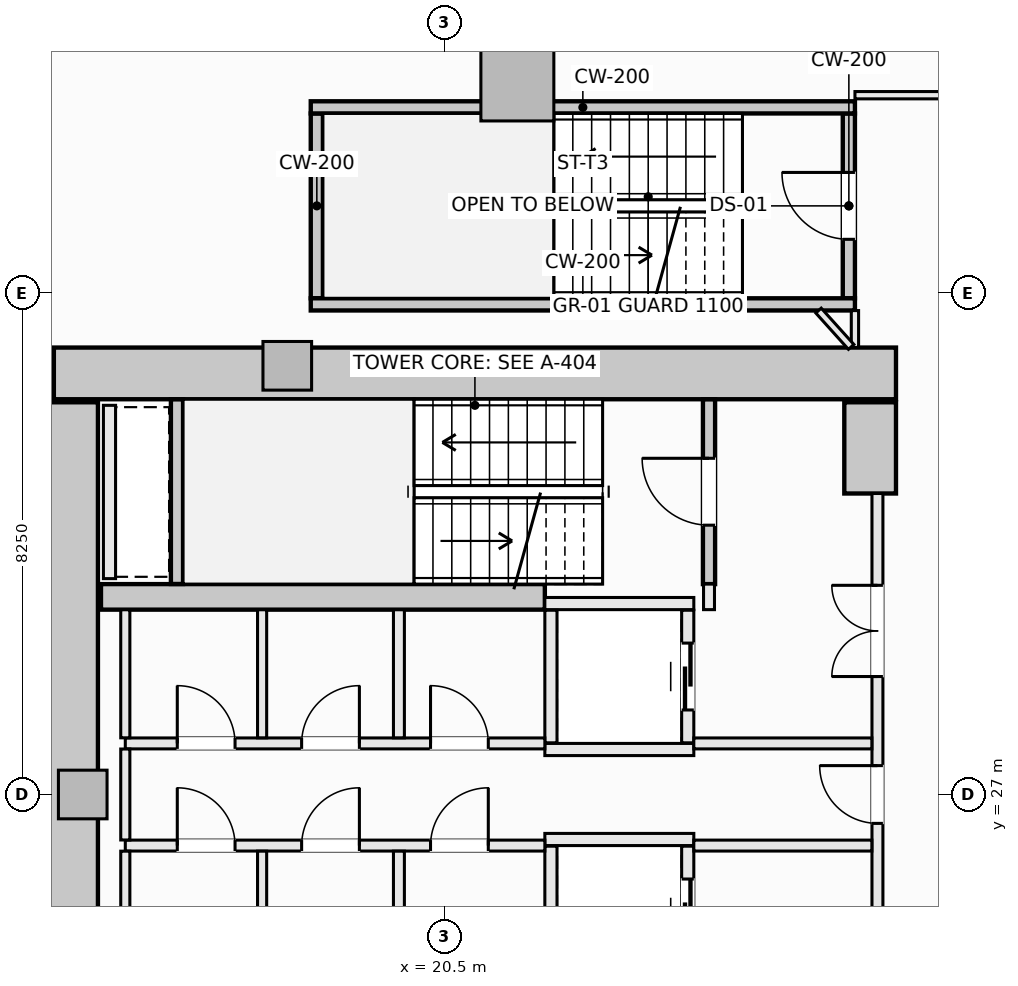
"""IFC4 building model, lengths in metres.
Left out: names, types, materials, properties, quantities, classifications, styles, units other than length and angle.
Written with IfcOpenShell. Run it as: python <this file> out.ifc"""

import sys

from ifc_helpers import new_model, si_unit, direction, frame, frame_2d, origin, origin_2d, place, context, subcontext, project, spatial, rectangle, extrude, element, fill, save


model = new_model("IFC4")
c1 = context("Model", 3, precision=1e-05, world=origin(), true_north=direction((0.0, 1.0)))
c2 = subcontext(c1, "Body", "Model", "MODEL_VIEW")
j1 = project(units=[si_unit("LENGTHUNIT", "METRE"), si_unit("PLANEANGLEUNIT", "RADIAN")], contexts=[c1])
p1 = place(None, origin())
s1 = spatial("IfcSite", under=j1, at=p1, CompositionType="ELEMENT")
p2 = place(p1, origin())
s2 = spatial("IfcBuilding", under=s1, at=p2, CompositionType="ELEMENT")
p3 = place(p2, frame((0.0, 0.0, 91.95)))
s3 = spatial("IfcBuildingStorey", under=s2, at=p3, CompositionType="ELEMENT", Elevation=91.95)
p4 = place(p3, frame((14.075, 33.925, -0.28), z_axis=(0.0, 0.0, 1.0), x_axis=(1.0, 0.0, 0.0)))
e1 = element("IfcWall", 1, at=p4, inside=s3, PredefinedType="SHEAR", context=c2, shape_type="SweptSolid", body=[
    extrude(rectangle(XDim=13.85, YDim=0.85, at=frame_2d((6.925, 0.0))), origin(), (0.0, 0.0, 1.0), 3.81),
])
p5 = place(p3, frame((14.375, 20.55, -0.28), z_axis=(0.0, 0.0, 1.0), x_axis=(0.0, 1.0, 0.0)))
e2 = element("IfcWall", 2, at=p5, inside=s3, PredefinedType="SHEAR", context=c2, shape_type="SweptSolid", body=[
    extrude(rectangle(XDim=12.9, YDim=0.85, at=frame_2d((6.45, 0.0))), origin(), (0.0, 0.0, 1.0), 3.81),
])
p6 = place(p3, frame((27.5, 31.95, -0.28), z_axis=(0.0, 0.0, 1.0), x_axis=(0.0, 1.0, 0.0)))
e3 = element("IfcWall", 3, at=p6, inside=s3, PredefinedType="SHEAR", context=c2, shape_type="SweptSolid", body=[
    extrude(rectangle(XDim=1.5, YDim=0.85, at=frame_2d((0.75, 0.0))), origin(), (0.0, 0.0, 1.0), 3.81),
])
p7 = place(p3, frame((14.85, 30.25, -0.28), z_axis=(0.0, 0.0, 1.0), x_axis=(1.0, 0.0, 0.0)))
e4 = element("IfcWall", 4, at=p7, inside=s3, PredefinedType="SHEAR", context=c2, shape_type="SweptSolid", body=[
    extrude(rectangle(XDim=7.3, YDim=0.42, at=frame_2d((3.65, 0.0))), origin(), (0.0, 0.0, 1.0), 3.81),
])
p8 = place(p3, frame((21.698, 38.677, -0.28), z_axis=(0.0, 0.0, 1.0), x_axis=(1.0, 0.0, 0.0)))
e5 = element("IfcColumn", 5, at=p8, inside=s3, PredefinedType="COLUMN", context=c2, shape_type="SweptSolid", body=[
    extrude(rectangle(XDim=1.2, YDim=1.2, at=origin_2d()), origin(), (0.0, 0.0, 1.0), 3.81),
])
for number, where, z_axis, x_axis in (
    (6, (17.914, 34.05, -0.28), (0.0, 0.0, 1.0), (1.0, 0.0, 0.0)),
    (7, (14.55, 27.0, -0.28), (0.0, 0.0, 1.0), (1.0, 0.0, 0.0)),
):
    element("IfcColumn", number, at=place(p3, frame(where, z_axis=z_axis, x_axis=x_axis)), inside=s3, PredefinedType="PILASTER", context=c2, shape_type="SweptSolid", body=[
        extrude(rectangle(XDim=0.8, YDim=0.8, at=origin_2d()), origin(), (0.0, 0.0, 1.0), 3.81),
    ])
p9 = place(p3, frame((24.85, 30.46, -0.28), z_axis=(0.0, 0.0, 1.0), x_axis=(0.0, 1.0, 0.0)))
e8 = element("IfcWall", 8, at=p9, inside=s3, PredefinedType="SHEAR", context=c2, shape_type="SweptSolid", body=[
    extrude(rectangle(XDim=3.038, YDim=0.2, at=frame_2d((1.519, 0.0))), origin(), (0.0, 0.0, 1.0), 3.81),
])
p10 = place(p9, frame((0.969, 0.0, 0.28)))
e9 = element("IfcOpeningElement", 9, at=p10, cuts=e8, PredefinedType="OPENING", context=c2, shape_type="SweptSolid", body=[
    extrude(rectangle(XDim=1.1, YDim=2.15, at=frame_2d((0.55, 1.075))), frame((0.0, 0.11, 0.0), z_axis=(0.0, -1.0, 0.0), x_axis=(1.0, 0.0, 0.0)), (0.0, 0.0, 1.0), 0.22),
])
p11 = place(p3, frame((16.1, 30.462, -0.28), z_axis=(0.0, 0.0, 1.0), x_axis=(0.0, 1.0, 0.0)))
e10 = element("IfcWall", 10, at=p11, inside=s3, PredefinedType="SHEAR", context=c2, shape_type="SweptSolid", body=[
    extrude(rectangle(XDim=3.036, YDim=0.2, at=frame_2d((1.518, 0.0))), origin(), (0.0, 0.0, 1.0), 3.81),
])
p12 = place(p3, frame((27.15, 35.16, -0.28), z_axis=(0.0, 0.0, 1.0), x_axis=(0.0, 1.0, 0.0)))
e11 = element("IfcWall", 11, at=p12, inside=s3, PredefinedType="SHEAR", context=c2, shape_type="SweptSolid", body=[
    extrude(rectangle(XDim=3.04, YDim=0.2, at=frame_2d((1.52, 0.0))), origin(), (0.0, 0.0, 1.0), 3.81),
])
p13 = place(p12, frame((0.97, 0.0, 0.28)))
e12 = element("IfcOpeningElement", 12, at=p13, cuts=e11, PredefinedType="OPENING", context=c2, shape_type="SweptSolid", body=[
    extrude(rectangle(XDim=1.1, YDim=2.15, at=frame_2d((0.55, 1.075))), frame((0.0, 0.11, 0.0), z_axis=(0.0, -1.0, 0.0), x_axis=(1.0, 0.0, 0.0)), (0.0, 0.0, 1.0), 0.22),
])
p14 = place(p3, frame((18.4, 35.16, -0.28), z_axis=(0.0, 0.0, 1.0), x_axis=(0.0, 1.0, 0.0)))
e13 = element("IfcWall", 13, at=p14, inside=s3, PredefinedType="SHEAR", context=c2, shape_type="SweptSolid", body=[
    extrude(rectangle(XDim=3.04, YDim=0.2, at=frame_2d((1.52, 0.0))), origin(), (0.0, 0.0, 1.0), 3.81),
])
for number, where, z_axis, x_axis in (
    (14, (18.3, 38.3, -0.28), (0.0, 0.0, 1.0), (1.0, 0.0, 0.0)),
    (15, (18.3, 35.06, -0.28), (0.0, 0.0, 1.0), (1.0, 0.0, 0.0)),
):
    element("IfcWall", number, at=place(p3, frame(where, z_axis=z_axis, x_axis=x_axis)), inside=s3, PredefinedType="SHEAR", context=c2, shape_type="SweptSolid", body=[
        extrude(rectangle(XDim=8.95, YDim=0.2, at=frame_2d((4.475, 0.0))), origin(), (0.0, 0.0, 1.0), 3.81),
    ])
for number, where, z_axis, x_axis in (
    (16, (22.15, 30.14, 0.0), (0.0, 0.0, 1.0), (1.0, 0.0, 0.0)),
    (17, (22.15, 27.74, 0.0), (0.0, 0.0, 1.0), (1.0, 0.0, 0.0)),
):
    element("IfcWall", number, at=place(p3, frame(where, z_axis=z_axis, x_axis=x_axis)), inside=s3, PredefinedType="SOLIDWALL", context=c2, shape_type="SweptSolid", body=[
        extrude(rectangle(XDim=2.45, YDim=0.2, at=frame_2d((1.225, 0.0))), origin(), (0.0, 0.0, 1.0), 3.53),
    ])
p15 = place(p3, frame((22.25, 27.85, 0.0), z_axis=(0.0, 0.0, 1.0), x_axis=(0.0, 1.0, 0.0)))
e18 = element("IfcWall", 18, at=p15, inside=s3, PredefinedType="SOLIDWALL", context=c2, shape_type="SweptSolid", body=[
    extrude(rectangle(XDim=2.18, YDim=0.2, at=frame_2d((1.09, 0.0))), origin(), (0.0, 0.0, 1.0), 3.53),
])
p16 = place(p3, frame((24.5, 27.85, 0.0), z_axis=(0.0, 0.0, 1.0), x_axis=(0.0, 1.0, 0.0)))
e19 = element("IfcWall", 19, at=p16, inside=s3, PredefinedType="SOLIDWALL", context=c2, shape_type="SweptSolid", body=[
    extrude(rectangle(XDim=2.18, YDim=0.2, at=frame_2d((1.09, 0.0))), origin(), (0.0, 0.0, 1.0), 3.53),
])
p17 = place(p16, frame((0.54, 0.0, 0.0)))
e20 = element("IfcOpeningElement", 20, at=p17, cuts=e19, PredefinedType="OPENING", context=c2, shape_type="SweptSolid", body=[
    extrude(rectangle(XDim=1.1, YDim=2.2, at=frame_2d((0.55, 1.1))), frame((0.0, 0.11, 0.0), z_axis=(0.0, -1.0, 0.0), x_axis=(1.0, 0.0, 0.0)), (0.0, 0.0, 1.0), 0.22),
])
p18 = place(p3, frame((22.15, 26.26, 0.0), z_axis=(0.0, 0.0, 1.0), x_axis=(1.0, 0.0, 0.0)))
e21 = element("IfcWall", 21, at=p18, inside=s3, PredefinedType="SOLIDWALL", context=c2, shape_type="SweptSolid", body=[
    extrude(rectangle(XDim=2.45, YDim=0.2, at=frame_2d((1.225, 0.0))), origin(), (0.0, 0.0, 1.0), 3.53),
])
p19 = place(p3, frame((22.25, 23.97, 0.0), z_axis=(0.0, 0.0, 1.0), x_axis=(0.0, 1.0, 0.0)))
e22 = element("IfcWall", 22, at=p19, inside=s3, PredefinedType="SOLIDWALL", context=c2, shape_type="SweptSolid", body=[
    extrude(rectangle(XDim=2.18, YDim=0.2, at=frame_2d((1.09, 0.0))), origin(), (0.0, 0.0, 1.0), 3.53),
])
p20 = place(p3, frame((24.5, 23.97, 0.0), z_axis=(0.0, 0.0, 1.0), x_axis=(0.0, 1.0, 0.0)))
e23 = element("IfcWall", 23, at=p20, inside=s3, PredefinedType="SOLIDWALL", context=c2, shape_type="SweptSolid", body=[
    extrude(rectangle(XDim=2.18, YDim=0.2, at=frame_2d((1.09, 0.0))), origin(), (0.0, 0.0, 1.0), 3.53),
])
p21 = place(p20, frame((0.54, 0.0, 0.0)))
e24 = element("IfcOpeningElement", 24, at=p21, cuts=e23, PredefinedType="OPENING", context=c2, shape_type="SweptSolid", body=[
    extrude(rectangle(XDim=1.1, YDim=2.2, at=frame_2d((0.55, 1.1))), frame((0.0, 0.11, 0.0), z_axis=(0.0, -1.0, 0.0), x_axis=(1.0, 0.0, 0.0)), (0.0, 0.0, 1.0), 0.22),
])
p22 = place(p3, frame((14.99, 30.55, 0.0), z_axis=(0.0, 0.0, 1.0), x_axis=(0.0, 1.0, 0.0)))
e25 = element("IfcWall", 25, at=p22, inside=s3, PredefinedType="SOLIDWALL", context=c2, shape_type="SweptSolid", body=[
    extrude(rectangle(XDim=2.85, YDim=0.2, at=frame_2d((1.425, 0.0))), origin(), (0.0, 0.0, 1.0), 3.53),
])
p23 = place(p3, frame((24.85, 30.04, 0.0), z_axis=(0.0, 0.0, 1.0), x_axis=(0.0, 1.0, 0.0)))
e26 = element("IfcWall", 26, at=p23, inside=s3, PredefinedType="SOLIDWALL", context=c2, shape_type="SweptSolid", body=[
    extrude(rectangle(XDim=0.42, YDim=0.18, at=frame_2d((0.21, 0.0))), origin(), (0.0, 0.0, 1.0), 3.53),
])
p24 = place(p3, frame((27.62, 22.05, 0.0), z_axis=(0.0, 0.0, 1.0), x_axis=(0.0, 1.0, 0.0)))
e27 = element("IfcWall", 27, at=p24, inside=s3, PredefinedType="SOLIDWALL", context=c2, shape_type="SweptSolid", body=[
    extrude(rectangle(XDim=9.9, YDim=0.18, at=frame_2d((4.95, 0.0))), origin(), (0.0, 0.0, 1.0), 2.622),
])
p25 = place(p24, frame((4.475, 0.0, 0.0)))
e28 = element("IfcOpeningElement", 28, at=p25, cuts=e27, PredefinedType="OPENING", context=c2, shape_type="SweptSolid", body=[
    extrude(rectangle(XDim=0.95, YDim=2.1, at=frame_2d((0.475, 1.05))), frame((0.0, 0.1, 0.0), z_axis=(0.0, -1.0, 0.0), x_axis=(1.0, 0.0, 0.0)), (0.0, 0.0, 1.0), 0.2),
])
p26 = place(p24, frame((6.89, 0.0, 0.0)))
e29 = element("IfcOpeningElement", 29, at=p26, cuts=e27, PredefinedType="OPENING", context=c2, shape_type="SweptSolid", body=[
    extrude(rectangle(XDim=1.5, YDim=2.2, at=frame_2d((0.75, 1.1))), frame((0.0, 0.1, 0.0), z_axis=(0.0, -1.0, 0.0), x_axis=(1.0, 0.0, 0.0)), (0.0, 0.0, 1.0), 0.2),
])
p27 = place(p24, frame((1.51, 0.0, 0.0)))
e30 = element("IfcOpeningElement", 30, at=p27, cuts=e27, PredefinedType="OPENING", context=c2, shape_type="SweptSolid", body=[
    extrude(rectangle(XDim=1.5, YDim=2.2, at=frame_2d((0.75, 1.1))), frame((0.0, 0.1, 0.0), z_axis=(0.0, -1.0, 0.0), x_axis=(1.0, 0.0, 0.0)), (0.0, 0.0, 1.0), 0.2),
])
p28 = place(p3, frame((15.25, 27.84, 0.0), z_axis=(0.0, 0.0, 1.0), x_axis=(1.0, 0.0, 0.0)))
e31 = element("IfcWall", 31, at=p28, inside=s3, PredefinedType="SOLIDWALL", context=c2, shape_type="SweptSolid", body=[
    extrude(rectangle(XDim=6.9, YDim=0.18, at=frame_2d((3.45, 0.0))), origin(), (0.0, 0.0, 1.0), 3.53),
])
p29 = place(p28, frame((5.02, 0.0, 0.0)))
e32 = element("IfcOpeningElement", 32, at=p29, cuts=e31, PredefinedType="OPENING", context=c2, shape_type="SweptSolid", body=[
    extrude(rectangle(XDim=0.95, YDim=2.1, at=frame_2d((0.475, 1.05))), frame((0.0, 0.1, 0.0), z_axis=(0.0, -1.0, 0.0), x_axis=(1.0, 0.0, 0.0)), (0.0, 0.0, 1.0), 0.2),
])
p30 = place(p28, frame((0.855, 0.0, 0.0)))
e33 = element("IfcOpeningElement", 33, at=p30, cuts=e31, PredefinedType="OPENING", context=c2, shape_type="SweptSolid", body=[
    extrude(rectangle(XDim=0.95, YDim=2.1, at=frame_2d((0.475, 1.05))), frame((0.0, 0.1, 0.0), z_axis=(0.0, -1.0, 0.0), x_axis=(1.0, 0.0, 0.0)), (0.0, 0.0, 1.0), 0.2),
])
p31 = place(p28, frame((2.9, 0.0, 0.0)))
e34 = element("IfcOpeningElement", 34, at=p31, cuts=e31, PredefinedType="OPENING", context=c2, shape_type="SweptSolid", body=[
    extrude(rectangle(XDim=0.95, YDim=2.1, at=frame_2d((0.475, 1.05))), frame((0.0, 0.1, 0.0), z_axis=(0.0, -1.0, 0.0), x_axis=(1.0, 0.0, 0.0)), (0.0, 0.0, 1.0), 0.2),
])
p32 = place(p3, frame((24.6, 27.84, 0.0), z_axis=(0.0, 0.0, 1.0), x_axis=(1.0, 0.0, 0.0)))
e35 = element("IfcWall", 35, at=p32, inside=s3, PredefinedType="SOLIDWALL", context=c2, shape_type="SweptSolid", body=[
    extrude(rectangle(XDim=2.928, YDim=0.18, at=frame_2d((1.464, 0.0))), origin(), (0.0, 0.0, 1.0), 3.53),
])
p33 = place(p3, frame((15.25, 26.16, 0.0), z_axis=(0.0, 0.0, 1.0), x_axis=(1.0, 0.0, 0.0)))
e36 = element("IfcWall", 36, at=p33, inside=s3, PredefinedType="SOLIDWALL", context=c2, shape_type="SweptSolid", body=[
    extrude(rectangle(XDim=6.9, YDim=0.18, at=frame_2d((3.45, 0.0))), origin(), (0.0, 0.0, 1.0), 3.53),
])
p34 = place(p33, frame((5.02, 0.0, 0.0)))
e37 = element("IfcOpeningElement", 37, at=p34, cuts=e36, PredefinedType="OPENING", context=c2, shape_type="SweptSolid", body=[
    extrude(rectangle(XDim=0.95, YDim=2.1, at=frame_2d((0.475, 1.05))), frame((0.0, 0.1, 0.0), z_axis=(0.0, -1.0, 0.0), x_axis=(1.0, 0.0, 0.0)), (0.0, 0.0, 1.0), 0.2),
])
p35 = place(p33, frame((0.855, 0.0, 0.0)))
e38 = element("IfcOpeningElement", 38, at=p35, cuts=e36, PredefinedType="OPENING", context=c2, shape_type="SweptSolid", body=[
    extrude(rectangle(XDim=0.95, YDim=2.1, at=frame_2d((0.475, 1.05))), frame((0.0, 0.1, 0.0), z_axis=(0.0, -1.0, 0.0), x_axis=(1.0, 0.0, 0.0)), (0.0, 0.0, 1.0), 0.2),
])
p36 = place(p33, frame((2.9, 0.0, 0.0)))
e39 = element("IfcOpeningElement", 39, at=p36, cuts=e36, PredefinedType="OPENING", context=c2, shape_type="SweptSolid", body=[
    extrude(rectangle(XDim=0.95, YDim=2.1, at=frame_2d((0.475, 1.05))), frame((0.0, 0.1, 0.0), z_axis=(0.0, -1.0, 0.0), x_axis=(1.0, 0.0, 0.0)), (0.0, 0.0, 1.0), 0.2),
])
p37 = place(p3, frame((24.6, 26.16, 0.0), z_axis=(0.0, 0.0, 1.0), x_axis=(1.0, 0.0, 0.0)))
e40 = element("IfcWall", 40, at=p37, inside=s3, PredefinedType="SOLIDWALL", context=c2, shape_type="SweptSolid", body=[
    extrude(rectangle(XDim=2.928, YDim=0.18, at=frame_2d((1.464, 0.0))), origin(), (0.0, 0.0, 1.0), 3.53),
])
p38 = place(p3, frame((15.25, 23.962, 0.0), z_axis=(0.0, 0.0, 1.0), x_axis=(0.0, 1.0, 0.0)))
e41 = element("IfcWall", 41, at=p38, inside=s3, PredefinedType="PARTITIONING", context=c2, shape_type="SweptSolid", body=[
    extrude(rectangle(XDim=2.106, YDim=0.15, at=frame_2d((1.053, 0.0))), origin(), (0.0, 0.0, 1.0), 3.53),
])
p39 = place(p3, frame((15.25, 26.252, 0.0), z_axis=(0.0, 0.0, 1.0), x_axis=(0.0, 1.0, 0.0)))
e42 = element("IfcWall", 42, at=p39, inside=s3, PredefinedType="PARTITIONING", context=c2, shape_type="SweptSolid", body=[
    extrude(rectangle(XDim=1.496, YDim=0.15, at=frame_2d((0.748, 0.0))), origin(), (0.0, 0.0, 1.0), 3.53),
])
p40 = place(p3, frame((15.25, 27.932, 0.0), z_axis=(0.0, 0.0, 1.0), x_axis=(0.0, 1.0, 0.0)))
e43 = element("IfcWall", 43, at=p40, inside=s3, PredefinedType="PARTITIONING", context=c2, shape_type="SweptSolid", body=[
    extrude(rectangle(XDim=2.106, YDim=0.15, at=frame_2d((1.053, 0.0))), origin(), (0.0, 0.0, 1.0), 3.53),
])
for number, where, z_axis, x_axis in (
    (44, (19.75, 23.962, 0.0), (0.0, 0.0, 1.0), (0.0, 1.0, 0.0)),
    (45, (19.75, 27.932, 0.0), (0.0, 0.0, 1.0), (0.0, 1.0, 0.0)),
):
    element("IfcWall", number, at=place(p3, frame(where, z_axis=z_axis, x_axis=x_axis)), inside=s3, PredefinedType="SOLIDWALL", context=c2, shape_type="SweptSolid", body=[
        extrude(rectangle(XDim=2.106, YDim=0.18, at=frame_2d((1.053, 0.0))), origin(), (0.0, 0.0, 1.0), 3.53),
    ])
for number, where, z_axis, x_axis in (
    (46, (17.5, 23.962, 0.0), (0.0, 0.0, 1.0), (0.0, 1.0, 0.0)),
    (47, (17.5, 27.932, 0.0), (0.0, 0.0, 1.0), (0.0, 1.0, 0.0)),
):
    element("IfcWall", number, at=place(p3, frame(where, z_axis=z_axis, x_axis=x_axis)), inside=s3, PredefinedType="PARTITIONING", context=c2, shape_type="SweptSolid", body=[
        extrude(rectangle(XDim=2.106, YDim=0.15, at=frame_2d((1.053, 0.0))), origin(), (0.0, 0.0, 1.0), 3.53),
    ])
p41 = place(p3, frame((27.25, 34.352, 0.0), z_axis=(0.0, 0.0, 1.0), x_axis=(0.0, 1.0, 0.0)))
e48 = element("IfcWall", 48, at=p41, inside=s3, PredefinedType="PARTITIONING", context=c2, shape_type="SweptSolid", body=[
    extrude(rectangle(XDim=0.606, YDim=0.12, at=frame_2d((0.303, 0.0))), origin(), (0.0, 0.0, 1.0), 3.53),
])
p42 = place(p3, frame((27.25, 38.5, 0.0), z_axis=(0.0, 0.0, 1.0), x_axis=(1.0, 0.0, 0.0)))
e49 = element("IfcWall", 49, at=p42, inside=s3, PredefinedType="PARTITIONING", context=c2, shape_type="SweptSolid", body=[
    extrude(rectangle(XDim=2.53, YDim=0.12, at=frame_2d((1.265, 0.0))), origin(), (0.0, 0.0, 1.0), 3.53),
])
p43 = place(p3, frame((26.651, 34.958, 0.0), z_axis=(0.0, 0.0, 1.0), x_axis=(0.668729584791, -0.743505711091, 0.0)))
e50 = element("IfcWall", 50, at=p43, inside=s3, PredefinedType="PARTITIONING", context=c2, shape_type="SweptSolid", body=[
    extrude(rectangle(XDim=0.803, YDim=0.12, at=frame_2d((0.402, 0.0))), origin(), (0.0, 0.0, 1.0), 3.53),
])
p44 = place(p10, origin())
e51 = element("IfcDoor", 51, at=p44, inside=s3, OperationType="SINGLE_SWING_RIGHT", PredefinedType="DOOR", context=c2, shape_type="SweptSolid", body=[
    extrude(rectangle(XDim=1.1, YDim=2.15, at=frame_2d((0.55, 1.075))), frame((0.0, 0.025, 0.0), z_axis=(0.0, -1.0, 0.0), x_axis=(1.0, 0.0, 0.0)), (0.0, 0.0, 1.0), 0.05),
])
fill(e9, e51)
p45 = place(p13, origin())
e52 = element("IfcDoor", 52, at=p45, inside=s3, OperationType="SINGLE_SWING_RIGHT", PredefinedType="DOOR", context=c2, shape_type="SweptSolid", body=[
    extrude(rectangle(XDim=1.1, YDim=2.15, at=frame_2d((0.55, 1.075))), frame((0.0, 0.025, 0.0), z_axis=(0.0, -1.0, 0.0), x_axis=(1.0, 0.0, 0.0)), (0.0, 0.0, 1.0), 0.05),
])
fill(e12, e52)
p46 = place(p17, origin())
e53 = element("IfcDoor", 53, at=p46, inside=s3, OperationType="SLIDING_TO_LEFT", PredefinedType="DOOR", context=c2, shape_type="SweptSolid", body=[
    extrude(rectangle(XDim=1.1, YDim=2.2, at=frame_2d((0.55, 1.1))), frame((0.0, 0.025, 0.0), z_axis=(0.0, -1.0, 0.0), x_axis=(1.0, 0.0, 0.0)), (0.0, 0.0, 1.0), 0.05),
])
fill(e20, e53)
p47 = place(p21, origin())
e54 = element("IfcDoor", 54, at=p47, inside=s3, OperationType="SLIDING_TO_LEFT", PredefinedType="DOOR", context=c2, shape_type="SweptSolid", body=[
    extrude(rectangle(XDim=1.1, YDim=2.2, at=frame_2d((0.55, 1.1))), frame((0.0, 0.025, 0.0), z_axis=(0.0, -1.0, 0.0), x_axis=(1.0, 0.0, 0.0)), (0.0, 0.0, 1.0), 0.05),
])
fill(e24, e54)
p48 = place(p25, origin())
e55 = element("IfcDoor", 55, at=p48, inside=s3, OperationType="SINGLE_SWING_RIGHT", PredefinedType="DOOR", context=c2, shape_type="SweptSolid", body=[
    extrude(rectangle(XDim=0.95, YDim=2.1, at=frame_2d((0.475, 1.05))), frame((0.0, 0.025, 0.0), z_axis=(0.0, -1.0, 0.0), x_axis=(1.0, 0.0, 0.0)), (0.0, 0.0, 1.0), 0.05),
])
fill(e28, e55)
p49 = place(p26, origin())
e56 = element("IfcDoor", 56, at=p49, inside=s3, OperationType="DOUBLE_DOOR_SINGLE_SWING", PredefinedType="DOOR", context=c2, shape_type="SweptSolid", body=[
    extrude(rectangle(XDim=1.5, YDim=2.2, at=frame_2d((0.75, 1.1))), frame((0.0, 0.025, 0.0), z_axis=(0.0, -1.0, 0.0), x_axis=(1.0, 0.0, 0.0)), (0.0, 0.0, 1.0), 0.05),
])
fill(e29, e56)
p50 = place(p29, origin())
e57 = element("IfcDoor", 57, at=p50, inside=s3, OperationType="SINGLE_SWING_LEFT", PredefinedType="DOOR", context=c2, shape_type="SweptSolid", body=[
    extrude(rectangle(XDim=0.95, YDim=2.1, at=frame_2d((0.475, 1.05))), frame((0.0, 0.025, 0.0), z_axis=(0.0, -1.0, 0.0), x_axis=(1.0, 0.0, 0.0)), (0.0, 0.0, 1.0), 0.05),
])
fill(e32, e57)
p51 = place(p34, origin())
e58 = element("IfcDoor", 58, at=p51, inside=s3, OperationType="SINGLE_SWING_RIGHT", PredefinedType="DOOR", context=c2, shape_type="SweptSolid", body=[
    extrude(rectangle(XDim=0.95, YDim=2.1, at=frame_2d((0.475, 1.05))), frame((0.0, 0.025, 0.0), z_axis=(0.0, -1.0, 0.0), x_axis=(1.0, 0.0, 0.0)), (0.0, 0.0, 1.0), 0.05),
])
fill(e37, e58)
p52 = place(p30, origin())
e59 = element("IfcDoor", 59, at=p52, inside=s3, OperationType="SINGLE_SWING_LEFT", PredefinedType="DOOR", context=c2, shape_type="SweptSolid", body=[
    extrude(rectangle(XDim=0.95, YDim=2.1, at=frame_2d((0.475, 1.05))), frame((0.0, 0.025, 0.0), z_axis=(0.0, -1.0, 0.0), x_axis=(1.0, 0.0, 0.0)), (0.0, 0.0, 1.0), 0.05),
])
fill(e33, e59)
p53 = place(p31, origin())
e60 = element("IfcDoor", 60, at=p53, inside=s3, OperationType="SINGLE_SWING_RIGHT", PredefinedType="DOOR", context=c2, shape_type="SweptSolid", body=[
    extrude(rectangle(XDim=0.95, YDim=2.1, at=frame_2d((0.475, 1.05))), frame((0.0, 0.025, 0.0), z_axis=(0.0, -1.0, 0.0), x_axis=(1.0, 0.0, 0.0)), (0.0, 0.0, 1.0), 0.05),
])
fill(e34, e60)
p54 = place(p35, origin())
e61 = element("IfcDoor", 61, at=p54, inside=s3, OperationType="SINGLE_SWING_LEFT", PredefinedType="DOOR", context=c2, shape_type="SweptSolid", body=[
    extrude(rectangle(XDim=0.95, YDim=2.1, at=frame_2d((0.475, 1.05))), frame((0.0, 0.025, 0.0), z_axis=(0.0, -1.0, 0.0), x_axis=(1.0, 0.0, 0.0)), (0.0, 0.0, 1.0), 0.05),
])
fill(e38, e61)
p55 = place(p36, origin())
e62 = element("IfcDoor", 62, at=p55, inside=s3, OperationType="SINGLE_SWING_RIGHT", PredefinedType="DOOR", context=c2, shape_type="SweptSolid", body=[
    extrude(rectangle(XDim=0.95, YDim=2.1, at=frame_2d((0.475, 1.05))), frame((0.0, 0.025, 0.0), z_axis=(0.0, -1.0, 0.0), x_axis=(1.0, 0.0, 0.0)), (0.0, 0.0, 1.0), 0.05),
])
fill(e39, e62)
save(model, sys.argv[1])
